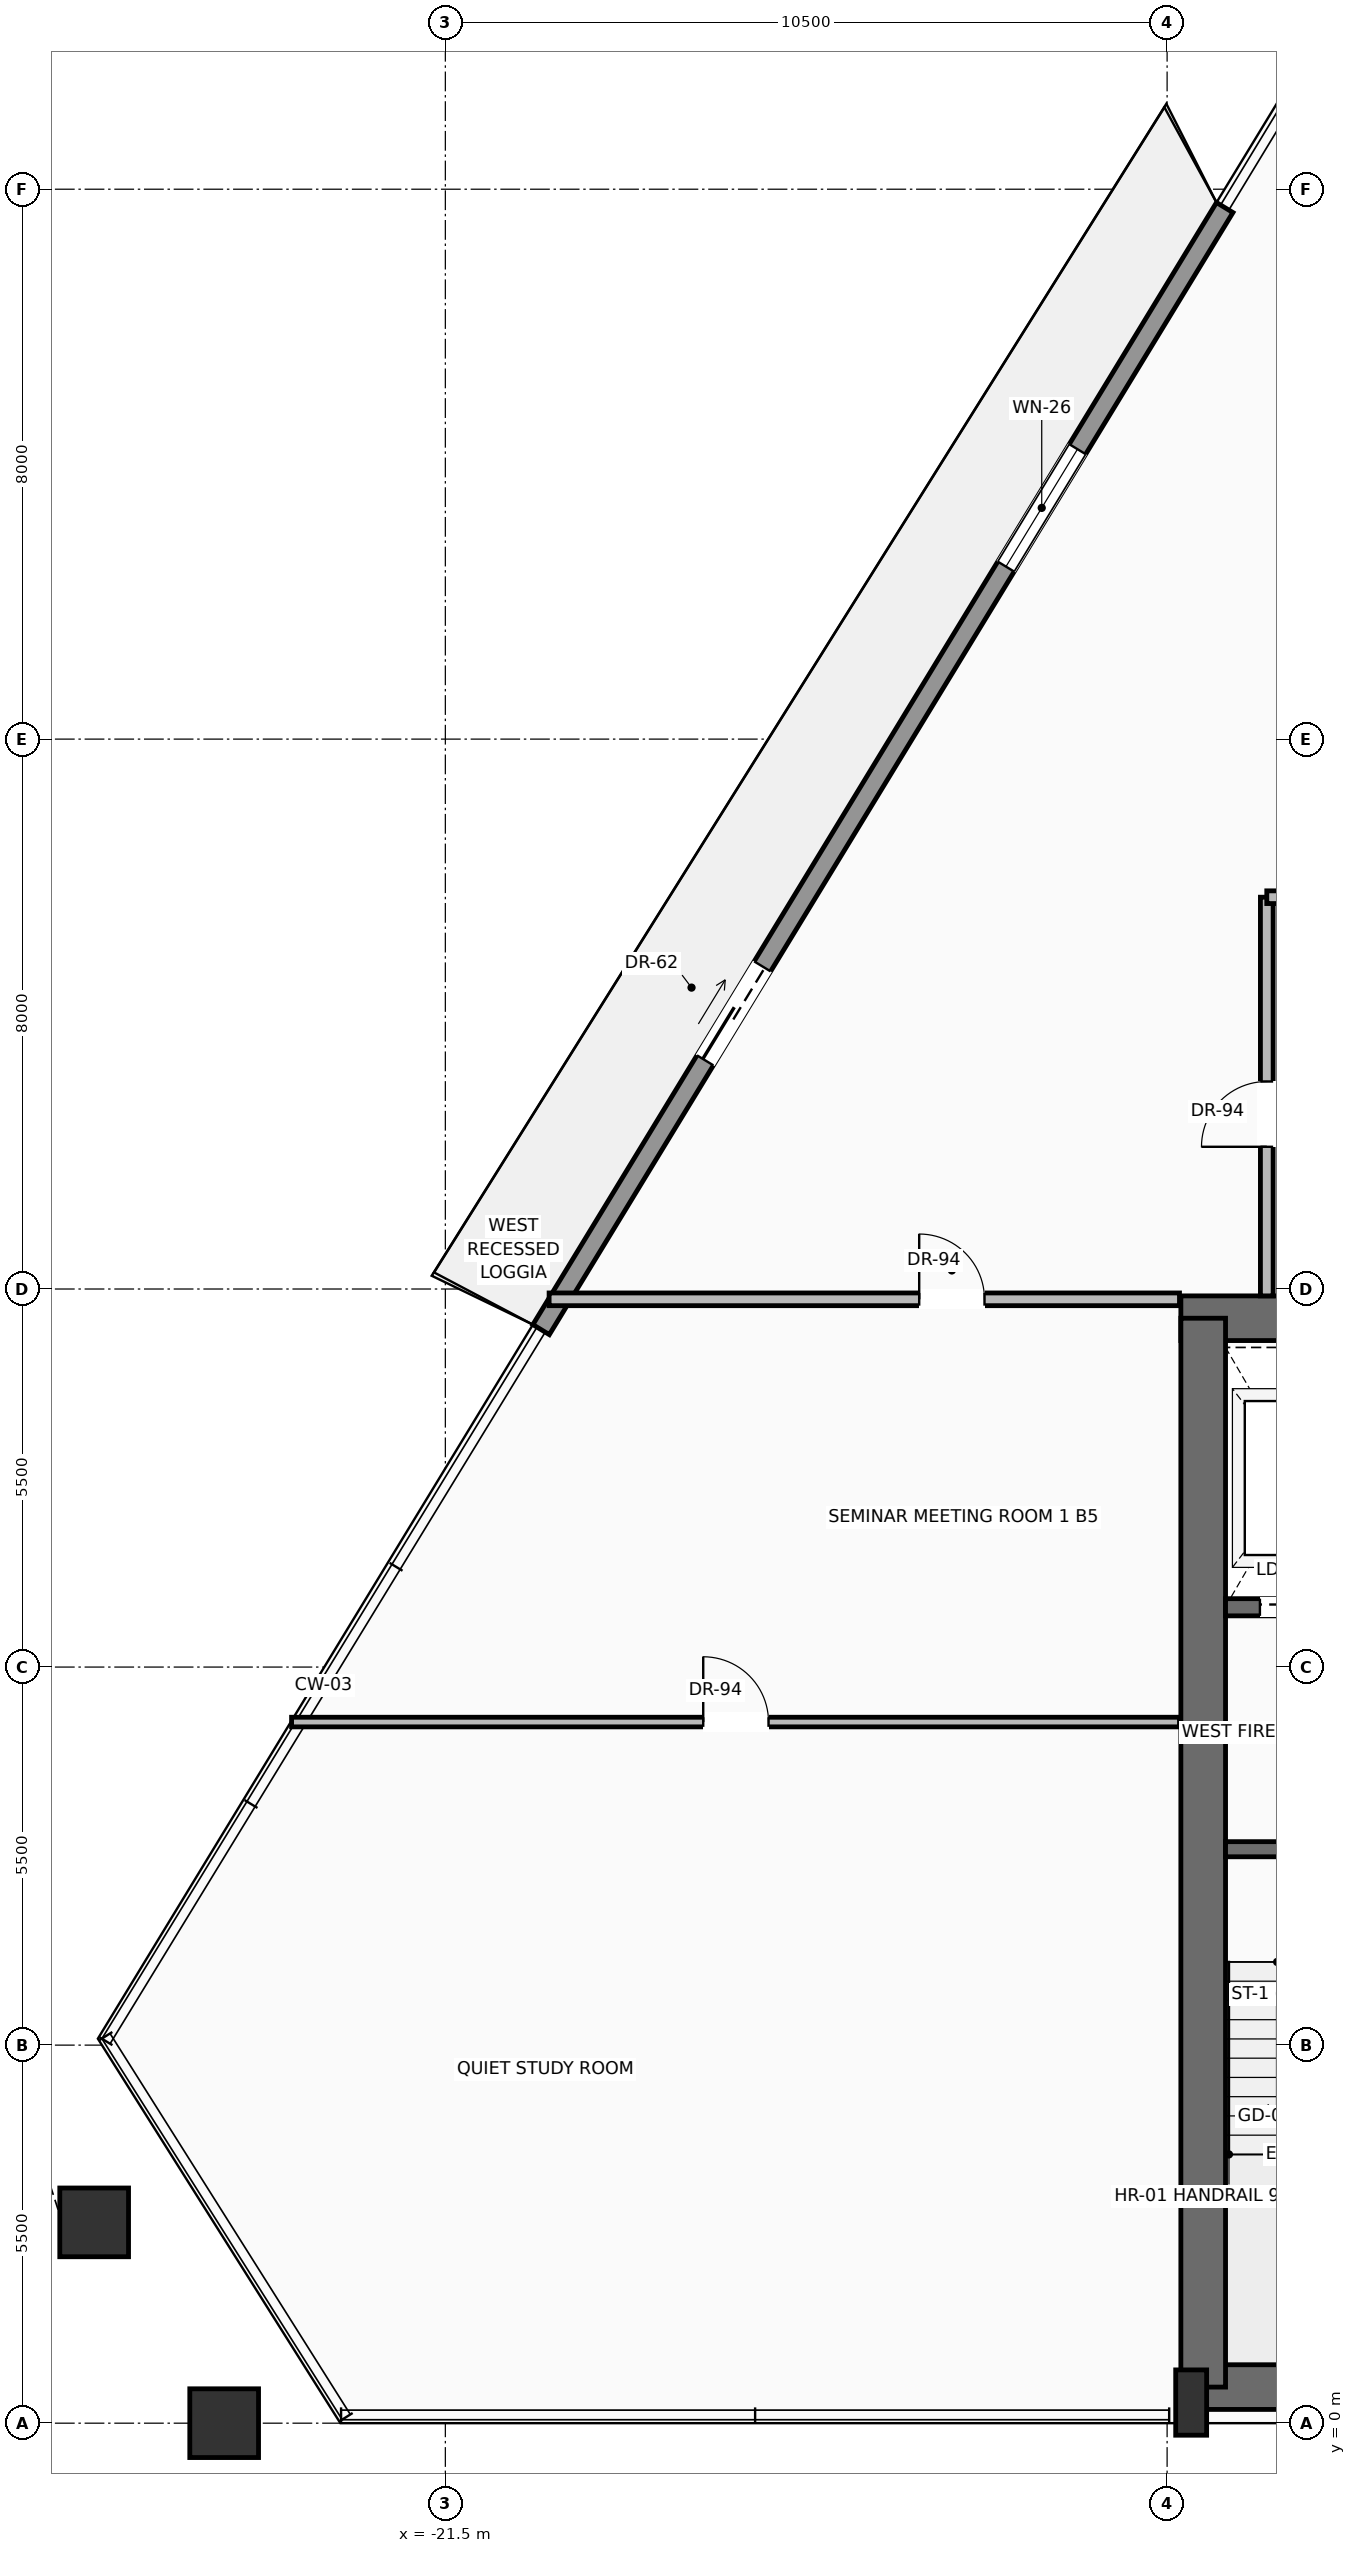
"""IFC4 building model, lengths in metres.
Left out: names, types, materials, properties, quantities, classifications, styles, units other than length and angle.
Written with IfcOpenShell. Run it as: python <this file> out.ifc"""

import sys

from ifc_helpers import new_model, si_unit, direction, frame, frame_2d, origin, origin_2d, place, context, subcontext, project, spatial, rectangle, hollow_rectangle, extrude, source, transform, mapped, element, fill, save


model = new_model("IFC4")
c1 = context("Model", 3, precision=1e-05, world=origin(), true_north=direction((0.0, 1.0)))
c2 = subcontext(c1, "Body", "Model", "MODEL_VIEW")
j1 = project(units=[si_unit("LENGTHUNIT", "METRE"), si_unit("PLANEANGLEUNIT", "RADIAN")], contexts=[c1])
p1 = place(None, origin())
s1 = spatial("IfcSite", under=j1, at=p1, CompositionType="ELEMENT")
p2 = place(p1, origin())
s2 = spatial("IfcBuilding", under=s1, at=p2, CompositionType="ELEMENT")
p3 = place(p2, frame((0.0, 0.0, 204.3)))
s3 = spatial("IfcBuildingStorey", under=s2, at=p3, CompositionType="ELEMENT", Elevation=204.3)
p4 = place(p3, frame((-10.65, 0.525, 0.0), z_axis=(0.0, 0.0, 1.0), x_axis=(1.0, 0.0, 0.0)))
e1 = element("IfcWall", 1, at=p4, inside=s3, PredefinedType="SHEAR", context=c2, shape_type="SweptSolid", body=[
    extrude(rectangle(XDim=21.3, YDim=0.65, at=frame_2d((10.65, 0.0))), origin(), (0.0, 0.0, 1.0), 3.47),
])
p5 = place(p3, frame((-10.8, 16.075, 0.0), z_axis=(0.0, 0.0, 1.0), x_axis=(1.0, 0.0, 0.0)))
e2 = element("IfcWall", 2, at=p5, inside=s3, PredefinedType="SHEAR", context=c2, shape_type="SweptSolid", body=[
    extrude(rectangle(XDim=21.6, YDim=0.65, at=frame_2d((10.8, 0.0))), origin(), (0.0, 0.0, 1.0), 3.47),
])
p6 = place(p5, frame((3.37, 0.0, 0.0)))
e3 = element("IfcOpeningElement", 3, at=p6, cuts=e2, PredefinedType="OPENING", context=c2, shape_type="SweptSolid", body=[
    extrude(rectangle(XDim=1.3, YDim=2.3, at=frame_2d((0.65, 1.15))), frame((0.0, 0.335, 0.0), z_axis=(0.0, -1.0, 0.0), x_axis=(1.0, 0.0, 0.0)), (0.0, 0.0, 1.0), 0.67),
])
p7 = place(p5, frame((9.8, 0.0, 0.0)))
e4 = element("IfcOpeningElement", 4, at=p7, cuts=e2, PredefinedType="OPENING", context=c2, shape_type="SweptSolid", body=[
    extrude(rectangle(XDim=2.0, YDim=2.4, at=frame_2d((1.0, 1.2))), frame((0.0, 0.335, 0.0), z_axis=(0.0, -1.0, 0.0), x_axis=(1.0, 0.0, 0.0)), (0.0, 0.0, 1.0), 0.67),
])
p8 = place(p3, frame((-10.475, 0.525, 0.0), z_axis=(0.0, 0.0, 1.0), x_axis=(0.0, 1.0, 0.0)))
e5 = element("IfcWall", 5, at=p8, inside=s3, PredefinedType="SHEAR", context=c2, shape_type="SweptSolid", body=[
    extrude(rectangle(XDim=15.55, YDim=0.65, at=frame_2d((7.775, 0.0))), origin(), (0.0, 0.0, 1.0), 3.47),
])
m1 = source(origin(), c2, "Body", "SweptSolid", [
    extrude(rectangle(XDim=0.45, YDim=0.95, at=origin_2d()), origin(), (0.0, 0.0, 1.0), 3.7),
])
p9 = place(p3, frame((-10.65, 0.3, 0.0), z_axis=(0.0, 0.0, 1.0), x_axis=(1.0, 0.0, 0.0)))
e6 = element("IfcColumn", 6, at=p9, inside=s3, PredefinedType="PILASTER", context=c2, shape_type="MappedRepresentation", body=[
    mapped(m1, transform((0.0, 0.0, 0.0), scale=1.0)),
])
m2 = source(origin(), c2, "Body", "SweptSolid", [
    extrude(hollow_rectangle(XDim=1.0, YDim=1.0, WallThickness=0.05, at=origin_2d()), origin(), (0.0, 0.0, 1.0), 3.691),
])
p10 = place(p3, frame((-24.718, 0.0, 0.004), z_axis=(-0.005820392182, 0.0, 0.999983061374), x_axis=(0.0, -1.0, 0.0)))
e7 = element("IfcColumn", 7, at=p10, inside=s3, PredefinedType="COLUMN", context=c2, shape_type="MappedRepresentation", body=[
    mapped(m2, transform((0.0, 0.0, 0.0), scale=1.0)),
])
m3 = source(origin(), c2, "Body", "SweptSolid", [
    extrude(hollow_rectangle(XDim=1.0, YDim=1.0, WallThickness=0.05, at=origin_2d()), origin(), (0.0, 0.0, 1.0), 3.692),
])
p11 = place(p3, frame((-26.609, 2.921, 0.004), z_axis=(0.004695468458, -0.015409072545, 0.999870248112), x_axis=(0.956574384198, 0.291488331665, 0.0)))
e8 = element("IfcColumn", 8, at=p11, inside=s3, PredefinedType="COLUMN", context=c2, shape_type="MappedRepresentation", body=[
    mapped(m3, transform((0.0, 0.0, 0.0), scale=1.0)),
])
p12 = place(p3, frame((-20.107, 15.909, 0.0), z_axis=(0.0, 0.0, 1.0), x_axis=(0.520259714572, 0.854008096796, 0.0)))
e9 = element("IfcWall", 9, at=p12, inside=s3, PredefinedType="SOLIDWALL", context=c2, shape_type="SweptSolid", body=[
    extrude(rectangle(XDim=19.115, YDim=0.28, at=frame_2d((9.558, 0.0))), origin(), (0.0, 0.0, 1.0), 3.05),
])
p13 = place(p12, frame((4.588, 0.0, 0.0)))
e10 = element("IfcOpeningElement", 10, at=p13, cuts=e9, PredefinedType="OPENING", context=c2, shape_type="SweptSolid", body=[
    extrude(rectangle(XDim=1.6, YDim=2.35, at=frame_2d((0.8, 1.175))), frame((0.0, 0.15, 0.0), z_axis=(0.0, -1.0, 0.0), x_axis=(1.0, 0.0, 0.0)), (0.0, 0.0, 1.0), 0.3),
])
p14 = place(p12, frame((12.998, 0.0, 0.9)))
e11 = element("IfcOpeningElement", 11, at=p14, cuts=e9, PredefinedType="OPENING", context=c2, shape_type="SweptSolid", body=[
    extrude(rectangle(XDim=2.0, YDim=1.85, at=frame_2d((1.0, 0.925))), frame((0.0, 0.15, 0.0), z_axis=(0.0, -1.0, 0.0), x_axis=(1.0, 0.0, 0.0)), (0.0, 0.0, 1.0), 0.3),
])
p15 = place(p3, frame((-5.5, 8.35, 0.0), z_axis=(0.0, 0.0, 1.0), x_axis=(-1.0, 0.0, 0.0)))
e12 = element("IfcWall", 12, at=p15, inside=s3, PredefinedType="SOLIDWALL", context=c2, shape_type="SweptSolid", body=[
    extrude(rectangle(XDim=4.65, YDim=0.22, at=frame_2d((2.325, 0.0))), origin(), (0.0, 0.0, 1.0), 3.47),
])
p16 = place(p15, frame((2.5, 0.0, 0.0)))
e13 = element("IfcOpeningElement", 13, at=p16, cuts=e12, PredefinedType="OPENING", context=c2, shape_type="SweptSolid", body=[
    extrude(rectangle(XDim=1.15, YDim=2.2, at=frame_2d((0.575, 1.1))), frame((0.0, 0.12, 0.0), z_axis=(0.0, -1.0, 0.0), x_axis=(1.0, 0.0, 0.0)), (0.0, 0.0, 1.0), 0.24),
])
p17 = place(p3, frame((-5.5, 11.87, 0.0), z_axis=(0.0, 0.0, 1.0), x_axis=(-1.0, 0.0, 0.0)))
e14 = element("IfcWall", 14, at=p17, inside=s3, PredefinedType="SOLIDWALL", context=c2, shape_type="SweptSolid", body=[
    extrude(rectangle(XDim=4.65, YDim=0.25, at=frame_2d((2.325, 0.0))), origin(), (0.0, 0.0, 1.0), 3.47),
])
p18 = place(p17, frame((2.95, 0.0, 0.0)))
e15 = element("IfcOpeningElement", 15, at=p18, cuts=e14, PredefinedType="OPENING", context=c2, shape_type="SweptSolid", body=[
    extrude(rectangle(XDim=1.2, YDim=2.25, at=frame_2d((0.6, 1.125))), frame((0.0, 0.135, 0.0), z_axis=(0.0, -1.0, 0.0), x_axis=(1.0, 0.0, 0.0)), (0.0, 0.0, 1.0), 0.27),
])
p19 = place(p3, frame((-9.55, 16.4, 0.0), z_axis=(0.0, 0.0, 1.0), x_axis=(0.0, 1.0, 0.0)))
e16 = element("IfcWall", 16, at=p19, inside=s3, PredefinedType="PARTITIONING", context=c2, shape_type="SweptSolid", body=[
    extrude(rectangle(XDim=5.8, YDim=0.185, at=frame_2d((2.9, 0.0))), origin(), (0.0, 0.0, 1.0), 3.462),
])
p20 = place(p19, frame((2.169, 0.0, 0.0)))
e17 = element("IfcOpeningElement", 17, at=p20, cuts=e16, PredefinedType="OPENING", context=c2, shape_type="SweptSolid", body=[
    extrude(rectangle(XDim=0.95, YDim=2.2, at=frame_2d((0.475, 1.1))), frame((0.0, 0.103, 0.0), z_axis=(0.0, -1.0, 0.0), x_axis=(1.0, 0.0, 0.0)), (0.0, 0.0, 1.0), 0.205),
])
p21 = place(p3, frame((-9.55, 22.2, 0.0), z_axis=(0.0, 0.0, 1.0), x_axis=(1.0, 0.0, 0.0)))
e18 = element("IfcWall", 18, at=p21, inside=s3, PredefinedType="PARTITIONING", context=c2, shape_type="SweptSolid", body=[
    extrude(rectangle(XDim=2.2, YDim=0.185, at=frame_2d((1.1, 0.0))), origin(), (0.0, 0.0, 1.0), 3.049),
])
p22 = place(p3, frame((-19.99, 16.35, 0.0), z_axis=(0.0, 0.0, 1.0), x_axis=(1.0, 0.0, 0.0)))
e19 = element("IfcWall", 19, at=p22, inside=s3, PredefinedType="PARTITIONING", context=c2, shape_type="SweptSolid", body=[
    extrude(rectangle(XDim=9.17, YDim=0.185, at=frame_2d((4.585, 0.0))), origin(), (0.0, 0.0, 1.0), 3.462),
])
p23 = place(p22, frame((5.384, 0.0, 0.0)))
e20 = element("IfcOpeningElement", 20, at=p23, cuts=e19, PredefinedType="OPENING", context=c2, shape_type="SweptSolid", body=[
    extrude(rectangle(XDim=0.95, YDim=2.2, at=frame_2d((0.475, 1.1))), frame((0.0, 0.103, 0.0), z_axis=(0.0, -1.0, 0.0), x_axis=(1.0, 0.0, 0.0)), (0.0, 0.0, 1.0), 0.205),
])
p24 = place(p3, frame((-23.737, 10.2, 0.0), z_axis=(0.0, 0.0, 1.0), x_axis=(1.0, 0.0, 0.0)))
e21 = element("IfcWall", 21, at=p24, inside=s3, PredefinedType="PARTITIONING", context=c2, shape_type="SweptSolid", body=[
    extrude(rectangle(XDim=12.917, YDim=0.14, at=frame_2d((6.458, 0.0))), origin(), (0.0, 0.0, 1.0), 3.462),
])
p25 = place(p24, frame((5.989, 0.0, 0.0)))
e22 = element("IfcOpeningElement", 22, at=p25, cuts=e21, PredefinedType="OPENING", context=c2, shape_type="SweptSolid", body=[
    extrude(rectangle(XDim=0.95, YDim=2.2, at=frame_2d((0.475, 1.1))), frame((0.0, 0.08, 0.0), z_axis=(0.0, -1.0, 0.0), x_axis=(1.0, 0.0, 0.0)), (0.0, 0.0, 1.0), 0.16),
])
m4 = source(origin(), c2, "Body", "SweptSolid", [
    extrude(rectangle(XDim=1.6, YDim=2.35, at=frame_2d((0.8, 1.175))), frame((0.0, 0.025, 0.0), z_axis=(0.0, -1.0, 0.0), x_axis=(1.0, 0.0, 0.0)), (0.0, 0.0, 1.0), 0.05),
])
p26 = place(p13, origin())
e23 = element("IfcDoor", 23, at=p26, inside=s3, OperationType="SLIDING_TO_LEFT", PredefinedType="DOOR", context=c2, shape_type="MappedRepresentation", body=[
    mapped(m4, transform((0.0, 0.0, 0.0), scale=1.0)),
])
fill(e10, e23)
m5 = source(origin(), c2, "Body", "SweptSolid", [
    extrude(rectangle(XDim=2.0, YDim=1.85, at=frame_2d((1.0, 0.925))), frame((0.0, 0.03, 0.0), z_axis=(0.0, -1.0, 0.0), x_axis=(1.0, 0.0, 0.0)), (0.0, 0.0, 1.0), 0.06),
])
p27 = place(p14, origin())
e24 = element("IfcWindow", 24, at=p27, inside=s3, PartitioningType="SINGLE_PANEL", PredefinedType="WINDOW", context=c2, shape_type="MappedRepresentation", body=[
    mapped(m5, transform((0.0, 0.0, 0.0), scale=1.0)),
])
fill(e11, e24)
m6 = source(origin(), c2, "Body", "SweptSolid", [
    extrude(rectangle(XDim=1.2, YDim=2.25, at=frame_2d((0.6, 1.125))), frame((0.0, 0.025, 0.0), z_axis=(0.0, -1.0, 0.0), x_axis=(1.0, 0.0, 0.0)), (0.0, 0.0, 1.0), 0.05),
])
p28 = place(p18, origin())
e25 = element("IfcDoor", 25, at=p28, inside=s3, OperationType="SLIDING_TO_LEFT", PredefinedType="DOOR", context=c2, shape_type="MappedRepresentation", body=[
    mapped(m6, transform((0.0, 0.0, 0.0), scale=1.0)),
])
fill(e15, e25)
m7 = source(origin(), c2, "Body", "SweptSolid", [
    extrude(rectangle(XDim=0.95, YDim=2.2, at=frame_2d((0.475, 1.1))), frame((0.0, 0.025, 0.0), z_axis=(0.0, -1.0, 0.0), x_axis=(1.0, 0.0, 0.0)), (0.0, 0.0, 1.0), 0.05),
])
p29 = place(p20, origin())
e26 = element("IfcDoor", 26, at=p29, inside=s3, OperationType="SINGLE_SWING_LEFT", PredefinedType="DOOR", context=c2, shape_type="MappedRepresentation", body=[
    mapped(m7, transform((0.0, 0.0, 0.0), scale=1.0)),
])
fill(e17, e26)
p30 = place(p23, origin())
e27 = element("IfcDoor", 27, at=p30, inside=s3, OperationType="SINGLE_SWING_LEFT", PredefinedType="DOOR", context=c2, shape_type="MappedRepresentation", body=[
    mapped(m7, transform((0.0, 0.0, 0.0), scale=1.0)),
])
fill(e20, e27)
p31 = place(p25, origin())
e28 = element("IfcDoor", 28, at=p31, inside=s3, OperationType="SINGLE_SWING_LEFT", PredefinedType="DOOR", context=c2, shape_type="MappedRepresentation", body=[
    mapped(m7, transform((0.0, 0.0, 0.0), scale=1.0)),
])
fill(e22, e28)
save(model, sys.argv[1])
